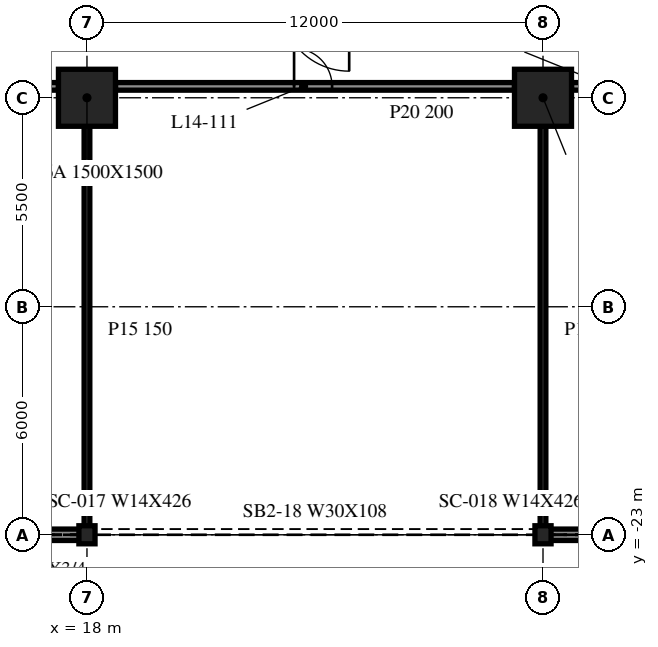
"""IFC4 building model, lengths in metres.
Left out: names, types, materials, properties, quantities, classifications, styles, units other than length and angle.
Written with IfcOpenShell. Run it as: python <this file> out.ifc"""

import sys

from ifc_helpers import new_model, si_unit, direction, frame, frame_2d, origin, origin_2d, place, context, subcontext, project, spatial, rectangle, i_section, extrude, element, fill, save


model = new_model("IFC4")
c1 = context("Model", 3, precision=1e-05, world=origin(), true_north=direction((0.0, 1.0)))
c2 = subcontext(c1, "Body", "Model", "MODEL_VIEW")
j1 = project(units=[si_unit("LENGTHUNIT", "METRE"), si_unit("PLANEANGLEUNIT", "RADIAN")], contexts=[c1])
p1 = place(None, origin())
s1 = spatial("IfcSite", under=j1, at=p1, CompositionType="ELEMENT")
p2 = place(p1, origin())
s2 = spatial("IfcBuilding", under=s1, at=p2, CompositionType="ELEMENT")
p3 = place(p2, frame((0.0, 0.0, 63.2)))
s3 = spatial("IfcBuildingStorey", under=s2, at=p3, CompositionType="ELEMENT", Elevation=63.2)
for number, where, z_axis, x_axis in (
    (1, (18.0, -11.5, -0.34), (0.0, 0.0, 1.0), (1.0, 0.0, 0.0)),
    (2, (30.0, -11.5, -0.34), (0.0, 0.0, 1.0), (1.0, 0.0, 0.0)),
):
    element("IfcColumn", number, at=place(p3, frame(where, z_axis=z_axis, x_axis=x_axis)), inside=s3, PredefinedType="COLUMN", context=c2, shape_type="SweptSolid", body=[
        extrude(rectangle(XDim=1.5, YDim=1.5, at=origin_2d()), origin(), (0.0, 0.0, 1.0), 4.3),
    ])
for number, where, z_axis, x_axis in (
    (3, (18.0, -23.0, -0.34), (0.0, 0.0, 1.0), (1.0, 0.0, 0.0)),
    (4, (30.0, -23.0, -0.34), (0.0, 0.0, 1.0), (1.0, 0.0, 0.0)),
):
    element("IfcColumn", number, at=place(p3, frame(where, z_axis=z_axis, x_axis=x_axis)), inside=s3, PredefinedType="COLUMN", context=c2, shape_type="SweptSolid", body=[
        extrude(i_section(OverallWidth=0.424, OverallDepth=0.475, WebThickness=0.048, FlangeThickness=0.077, at=origin_2d()), origin(), (0.0, 0.0, 1.0), 4.3),
    ])
for number, where, z_axis, x_axis in (
    (5, (6.024, -23.0, 0.0), (0.0, 0.0, 1.0), (1.0, 0.0, 0.0)),
    (6, (30.024, -23.0, 0.0), (0.0, 0.0, 1.0), (1.0, 0.0, 0.0)),
):
    element("IfcWall", number, at=place(p3, frame(where, z_axis=z_axis, x_axis=x_axis)), inside=s3, PredefinedType="NOTDEFINED", context=c2, shape_type="SweptSolid", body=[
        extrude(rectangle(XDim=11.952, YDim=0.3, at=frame_2d((5.976, 0.0))), origin(), (0.0, 0.0, 1.0), 3.203),
    ])
p4 = place(p3, frame((6.75, -11.2, 0.0), z_axis=(0.0, 0.0, 1.0), x_axis=(1.0, 0.0, 0.0)))
e7 = element("IfcWall", 7, at=p4, inside=s3, PredefinedType="PARTITIONING", context=c2, shape_type="SweptSolid", body=[
    extrude(rectangle(XDim=10.5, YDim=0.2, at=frame_2d((5.25, 0.0))), origin(), (0.0, 0.0, 1.0), 3.96),
])
p5 = place(p4, frame((0.7, 0.0, 0.0)))
e8 = element("IfcOpeningElement", 8, at=p5, cuts=e7, PredefinedType="OPENING", context=c2, shape_type="SweptSolid", body=[
    extrude(rectangle(XDim=1.2, YDim=2.1, at=frame_2d((0.6, 1.05))), frame((0.0, 0.11, 0.0), z_axis=(0.0, -1.0, 0.0), x_axis=(1.0, 0.0, 0.0)), (0.0, 0.0, 1.0), 0.22),
])
p6 = place(p4, frame((3.7, 0.0, 0.0)))
e9 = element("IfcOpeningElement", 9, at=p6, cuts=e7, PredefinedType="OPENING", context=c2, shape_type="SweptSolid", body=[
    extrude(rectangle(XDim=1.2, YDim=2.1, at=frame_2d((0.6, 1.05))), frame((0.0, 0.11, 0.0), z_axis=(0.0, -1.0, 0.0), x_axis=(1.0, 0.0, 0.0)), (0.0, 0.0, 1.0), 0.22),
])
p7 = place(p4, frame((5.5, 0.0, 0.0)))
e10 = element("IfcOpeningElement", 10, at=p7, cuts=e7, PredefinedType="OPENING", context=c2, shape_type="SweptSolid", body=[
    extrude(rectangle(XDim=1.2, YDim=2.1, at=frame_2d((0.6, 1.05))), frame((0.0, 0.11, 0.0), z_axis=(0.0, -1.0, 0.0), x_axis=(1.0, 0.0, 0.0)), (0.0, 0.0, 1.0), 0.22),
])
p8 = place(p3, frame((18.75, -11.2, 0.0), z_axis=(0.0, 0.0, 1.0), x_axis=(1.0, 0.0, 0.0)))
e11 = element("IfcWall", 11, at=p8, inside=s3, PredefinedType="PARTITIONING", context=c2, shape_type="SweptSolid", body=[
    extrude(rectangle(XDim=10.5, YDim=0.2, at=frame_2d((5.25, 0.0))), origin(), (0.0, 0.0, 1.0), 3.96),
])
p9 = place(p8, frame((4.7, 0.0, 0.0)))
e12 = element("IfcOpeningElement", 12, at=p9, cuts=e11, PredefinedType="OPENING", context=c2, shape_type="SweptSolid", body=[
    extrude(rectangle(XDim=1.0, YDim=2.1, at=frame_2d((0.5, 1.05))), frame((0.0, 0.11, 0.0), z_axis=(0.0, -1.0, 0.0), x_axis=(1.0, 0.0, 0.0)), (0.0, 0.0, 1.0), 0.22),
])
p10 = place(p3, frame((30.75, -11.2, 0.0), z_axis=(0.0, 0.0, 1.0), x_axis=(1.0, 0.0, 0.0)))
e13 = element("IfcWall", 13, at=p10, inside=s3, PredefinedType="PARTITIONING", context=c2, shape_type="SweptSolid", body=[
    extrude(rectangle(XDim=10.5, YDim=0.2, at=frame_2d((5.25, 0.0))), origin(), (0.0, 0.0, 1.0), 3.96),
])
p11 = place(p10, frame((0.7, 0.0, 0.0)))
e14 = element("IfcOpeningElement", 14, at=p11, cuts=e13, PredefinedType="OPENING", context=c2, shape_type="SweptSolid", body=[
    extrude(rectangle(XDim=1.2, YDim=2.1, at=frame_2d((0.6, 1.05))), frame((0.0, 0.11, 0.0), z_axis=(0.0, -1.0, 0.0), x_axis=(1.0, 0.0, 0.0)), (0.0, 0.0, 1.0), 0.22),
])
p12 = place(p10, frame((3.7, 0.0, 0.0)))
e15 = element("IfcOpeningElement", 15, at=p12, cuts=e13, PredefinedType="OPENING", context=c2, shape_type="SweptSolid", body=[
    extrude(rectangle(XDim=1.2, YDim=2.1, at=frame_2d((0.6, 1.05))), frame((0.0, 0.11, 0.0), z_axis=(0.0, -1.0, 0.0), x_axis=(1.0, 0.0, 0.0)), (0.0, 0.0, 1.0), 0.22),
])
p13 = place(p10, frame((5.5, 0.0, 0.0)))
e16 = element("IfcOpeningElement", 16, at=p13, cuts=e13, PredefinedType="OPENING", context=c2, shape_type="SweptSolid", body=[
    extrude(rectangle(XDim=1.2, YDim=2.1, at=frame_2d((0.6, 1.05))), frame((0.0, 0.11, 0.0), z_axis=(0.0, -1.0, 0.0), x_axis=(1.0, 0.0, 0.0)), (0.0, 0.0, 1.0), 0.22),
])
for number, where, z_axis, x_axis in (
    (17, (18.0, -22.975, 0.0), (0.0, 0.0, 1.0), (0.0, 1.0, 0.0)),
    (18, (30.0, -22.975, 0.0), (0.0, 0.0, 1.0), (0.0, 1.0, 0.0)),
):
    element("IfcWall", number, at=place(p3, frame(where, z_axis=z_axis, x_axis=x_axis)), inside=s3, PredefinedType="PARTITIONING", context=c2, shape_type="SweptSolid", body=[
        extrude(rectangle(XDim=10.725, YDim=0.15, at=frame_2d((5.363, 0.0))), origin(), (0.0, 0.0, 1.0), 3.96),
    ])
p14 = place(p9, origin())
e19 = element("IfcDoor", 19, at=p14, inside=s3, OperationType="SINGLE_SWING_RIGHT", PredefinedType="DOOR", context=c2, shape_type="SweptSolid", body=[
    extrude(rectangle(XDim=1.0, YDim=2.1, at=frame_2d((0.5, 1.05))), frame((0.0, 0.025, 0.0), z_axis=(0.0, -1.0, 0.0), x_axis=(1.0, 0.0, 0.0)), (0.0, 0.0, 1.0), 0.05),
])
fill(e12, e19)
save(model, sys.argv[1])
